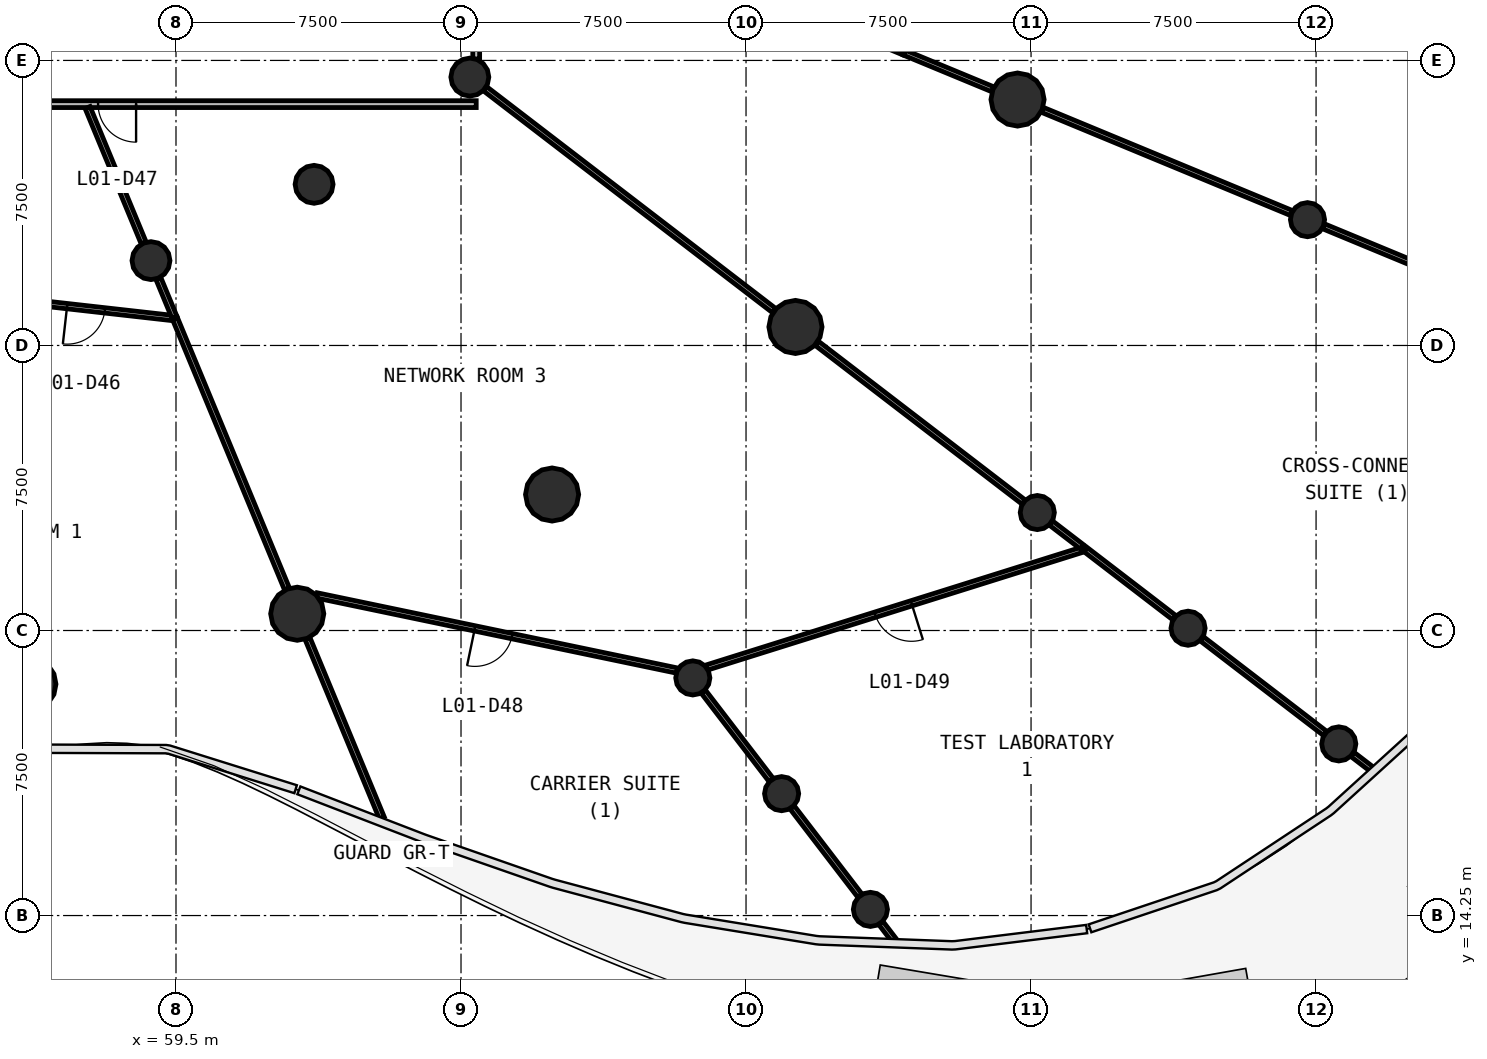
"""IFC4 building model, lengths in metres.
Left out: names, types, materials, properties, quantities, classifications, styles, units other than length and angle.
Written with IfcOpenShell. Run it as: python <this file> out.ifc"""

import sys

from ifc_helpers import new_model, si_unit, direction, frame, frame_2d, origin, origin_2d, place, context, subcontext, project, spatial, rectangle, circle, extrude, source, transform, mapped, element, fill, save


model = new_model("IFC4")
c1 = context("Model", 3, precision=1e-05, world=origin(), true_north=direction((0.0, 1.0)))
c2 = subcontext(c1, "Body", "Model", "MODEL_VIEW")
j1 = project(units=[si_unit("LENGTHUNIT", "METRE"), si_unit("PLANEANGLEUNIT", "RADIAN")], contexts=[c1])
p1 = place(None, origin())
s1 = spatial("IfcSite", under=j1, at=p1, CompositionType="ELEMENT")
p2 = place(p1, origin())
s2 = spatial("IfcBuilding", under=s1, at=p2, CompositionType="ELEMENT")
p3 = place(p2, frame((0.0, 0.0, 5.0)))
s3 = spatial("IfcBuildingStorey", under=s2, at=p3, CompositionType="ELEMENT", Elevation=5.0)
m1 = source(origin(), c2, "Body", "SweptSolid", [
    extrude(circle(Radius=0.7, at=origin_2d()), origin(), (0.0, 0.0, 1.0), 4.4),
])
for number, where, z_axis, x_axis in (
    (1, (55.642, 20.339, 0.0), (0.0, 0.0, 1.0), (1.0, 0.0, 0.0)),
    (2, (62.69, 22.191, 0.0), (0.0, 0.0, 1.0), (1.0, 0.0, 0.0)),
    (3, (69.396, 25.328, 0.0), (0.0, 0.0, 1.0), (1.0, 0.0, 0.0)),
    (4, (75.801, 29.737, 0.0), (0.0, 0.0, 1.0), (1.0, 0.0, 0.0)),
    (5, (81.645, 35.721, 0.0), (0.0, 0.0, 1.0), (1.0, 0.0, 0.0)),
):
    element("IfcColumn", number, at=place(p3, frame(where, z_axis=z_axis, x_axis=x_axis)), inside=s3, PredefinedType="COLUMN", context=c2, shape_type="MappedRepresentation", body=[
        mapped(m1, transform((0.0, 0.0, 0.0), scale=1.0)),
    ])
m2 = source(origin(), c2, "Body", "SweptSolid", [
    extrude(circle(Radius=0.5, at=origin_2d()), origin(), (0.0, 0.0, 1.0), 4.4),
])
for number, where, z_axis, x_axis in (
    (6, (58.842, 31.482, 0.0), (0.0, 0.0, 1.0), (1.0, 0.0, 0.0)),
    (7, (63.134, 33.49, 0.0), (0.0, 0.0, 1.0), (1.0, 0.0, 0.0)),
    (8, (67.232, 36.312, 0.0), (0.0, 0.0, 1.0), (1.0, 0.0, 0.0)),
):
    element("IfcColumn", number, at=place(p3, frame(where, z_axis=z_axis, x_axis=x_axis)), inside=s3, PredefinedType="COLUMN", context=c2, shape_type="MappedRepresentation", body=[
        mapped(m2, transform((0.0, 0.0, 0.0), scale=1.0)),
    ])
m3 = source(origin(), c2, "Body", "SweptSolid", [
    extrude(circle(Radius=0.45, at=origin_2d()), origin(), (0.0, 0.0, 1.0), 4.05),
])
for number, where, z_axis, x_axis in (
    (9, (77.773, 14.412, 0.0), (0.0, 0.0, 1.0), (1.0, 0.0, 0.0)),
    (10, (90.098, 18.767, 0.0), (0.0, 0.0, 1.0), (1.0, 0.0, 0.0)),
):
    element("IfcColumn", number, at=place(p3, frame(where, z_axis=z_axis, x_axis=x_axis)), inside=s3, PredefinedType="COLUMN", context=c2, shape_type="MappedRepresentation", body=[
        mapped(m3, transform((0.0, 0.0, 0.0), scale=1.0)),
    ])
m4 = source(origin(), c2, "Body", "SweptSolid", [
    extrude(circle(Radius=0.45, at=origin_2d()), origin(), (0.0, 0.0, 1.0), 4.4),
])
for number, where, z_axis, x_axis in (
    (11, (75.436, 17.457, 0.0), (0.0, 0.0, 1.0), (1.0, 0.0, 0.0)),
    (12, (86.131, 21.81, 0.0), (0.0, 0.0, 1.0), (1.0, 0.0, 0.0)),
    (13, (73.1, 20.503, 0.0), (0.0, 0.0, 1.0), (1.0, 0.0, 0.0)),
    (14, (82.165, 24.854, 0.0), (0.0, 0.0, 1.0), (1.0, 0.0, 0.0)),
    (15, (89.275, 32.56, 0.0), (0.0, 0.0, 1.0), (1.0, 0.0, 0.0)),
):
    element("IfcColumn", number, at=place(p3, frame(where, z_axis=z_axis, x_axis=x_axis)), inside=s3, PredefinedType="COLUMN", context=c2, shape_type="MappedRepresentation", body=[
        mapped(m4, transform((0.0, 0.0, 0.0), scale=1.0)),
    ])
p4 = place(p3, frame((67.4, 35.6, 0.0), z_axis=(0.0, 0.0, 1.0), x_axis=(-1.0, 0.0, 0.0)))
e16 = element("IfcWall", 16, at=p4, inside=s3, PredefinedType="PARTITIONING", context=c2, shape_type="SweptSolid", body=[
    extrude(rectangle(XDim=30.8, YDim=0.18, at=frame_2d((15.4, 0.0))), origin(), (0.0, 0.0, 1.0), 3.25),
])
p5 = place(p4, frame((17.35, 0.0, 0.0)))
e17 = element("IfcOpeningElement", 17, at=p5, cuts=e16, PredefinedType="OPENING", context=c2, shape_type="SweptSolid", body=[
    extrude(rectangle(XDim=1.0, YDim=2.1, at=frame_2d((0.5, 1.05))), frame((0.0, 0.1, 0.0), z_axis=(0.0, -1.0, 0.0), x_axis=(1.0, 0.0, 0.0)), (0.0, 0.0, 1.0), 0.2),
])
p6 = place(p4, frame((14.95, 0.0, 0.0)))
e18 = element("IfcOpeningElement", 18, at=p6, cuts=e16, PredefinedType="OPENING", context=c2, shape_type="SweptSolid", body=[
    extrude(rectangle(XDim=1.0, YDim=2.1, at=frame_2d((0.5, 1.05))), frame((0.0, 0.1, 0.0), z_axis=(0.0, -1.0, 0.0), x_axis=(1.0, 0.0, 0.0)), (0.0, 0.0, 1.0), 0.2),
])
p7 = place(p4, frame((8.95, 0.0, 0.0)))
e19 = element("IfcOpeningElement", 19, at=p7, cuts=e16, PredefinedType="OPENING", context=c2, shape_type="SweptSolid", body=[
    extrude(rectangle(XDim=1.0, YDim=2.1, at=frame_2d((0.5, 1.05))), frame((0.0, 0.1, 0.0), z_axis=(0.0, -1.0, 0.0), x_axis=(1.0, 0.0, 0.0)), (0.0, 0.0, 1.0), 0.2),
])
p8 = place(p3, frame((67.4, 60.37, 0.0), z_axis=(0.0, 0.0, 1.0), x_axis=(0.0, -1.0, 0.0)))
e20 = element("IfcWall", 20, at=p8, inside=s3, PredefinedType="PARTITIONING", context=c2, shape_type="SweptSolid", body=[
    extrude(rectangle(XDim=23.583, YDim=0.18, at=frame_2d((11.791, 0.0))), origin(), (0.0, 0.0, 1.0), 3.25),
])
p9 = place(p8, frame((11.333, 0.0, 0.0)))
e21 = element("IfcOpeningElement", 21, at=p9, cuts=e20, PredefinedType="OPENING", context=c2, shape_type="SweptSolid", body=[
    extrude(rectangle(XDim=1.0, YDim=2.1, at=frame_2d((0.5, 1.05))), frame((0.0, 0.1, 0.0), z_axis=(0.0, -1.0, 0.0), x_axis=(1.0, 0.0, 0.0)), (0.0, 0.0, 1.0), 0.2),
])
p10 = place(p8, frame((4.532, 0.0, 0.0)))
e22 = element("IfcOpeningElement", 22, at=p10, cuts=e20, PredefinedType="OPENING", context=c2, shape_type="SweptSolid", body=[
    extrude(rectangle(XDim=1.0, YDim=2.1, at=frame_2d((0.5, 1.05))), frame((0.0, 0.1, 0.0), z_axis=(0.0, -1.0, 0.0), x_axis=(1.0, 0.0, 0.0)), (0.0, 0.0, 1.0), 0.2),
])
p11 = place(p8, frame((19.133, 0.0, 0.0)))
e23 = element("IfcOpeningElement", 23, at=p11, cuts=e20, PredefinedType="OPENING", context=c2, shape_type="SweptSolid", body=[
    extrude(rectangle(XDim=1.0, YDim=2.1, at=frame_2d((0.5, 1.05))), frame((0.0, 0.1, 0.0), z_axis=(0.0, -1.0, 0.0), x_axis=(1.0, 0.0, 0.0)), (0.0, 0.0, 1.0), 0.2),
])
p12 = place(p3, frame((83.412, 23.896, 0.0), z_axis=(0.0, 0.0, 1.0), x_axis=(-0.954121832826, -0.299418650262, 0.0)))
e24 = element("IfcWall", 24, at=p12, inside=s3, PredefinedType="PARTITIONING", context=c2, shape_type="SweptSolid", body=[
    extrude(rectangle(XDim=10.427, YDim=0.14, at=frame_2d((5.213, 0.0))), origin(), (0.0, 0.0, 1.0), 3.25),
])
p13 = place(p12, frame((4.777, 0.0, 0.0)))
e25 = element("IfcOpeningElement", 25, at=p13, cuts=e24, PredefinedType="OPENING", context=c2, shape_type="SweptSolid", body=[
    extrude(rectangle(XDim=1.0, YDim=2.1, at=frame_2d((0.5, 1.05))), frame((0.0, 0.08, 0.0), z_axis=(0.0, -1.0, 0.0), x_axis=(1.0, 0.0, 0.0)), (0.0, 0.0, 1.0), 0.16),
])
p14 = place(p3, frame((72.688, 20.695, 0.0), z_axis=(0.0, 0.0, 1.0), x_axis=(-0.978931754846, 0.204187706176, 0.0)))
e26 = element("IfcWall", 26, at=p14, inside=s3, PredefinedType="PARTITIONING", context=c2, shape_type="SweptSolid", body=[
    extrude(rectangle(XDim=9.688, YDim=0.14, at=frame_2d((4.844, 0.0))), origin(), (0.0, 0.0, 1.0), 3.25),
])
p15 = place(p14, frame((4.438, 0.0, 0.0)))
e27 = element("IfcOpeningElement", 27, at=p15, cuts=e26, PredefinedType="OPENING", context=c2, shape_type="SweptSolid", body=[
    extrude(rectangle(XDim=1.0, YDim=2.1, at=frame_2d((0.5, 1.05))), frame((0.0, 0.08, 0.0), z_axis=(0.0, -1.0, 0.0), x_axis=(1.0, 0.0, 0.0)), (0.0, 0.0, 1.0), 0.16),
])
p16 = place(p3, frame((67.633, 36.005, 0.0), z_axis=(0.0, 0.0, 1.0), x_axis=(0.793366218398, -0.608744645566, 0.0)))
e28 = element("IfcWall", 28, at=p16, inside=s3, PredefinedType="PARTITIONING", context=c2, shape_type="SweptSolid", body=[
    extrude(rectangle(XDim=9.591, YDim=0.14, at=frame_2d((4.796, 0.0))), origin(), (0.0, 0.0, 1.0), 3.25),
])
p17 = place(p3, frame((71.439, 39.948, 0.0), z_axis=(0.0, 0.0, 1.0), x_axis=(0.923876369205, -0.382691069173, 0.0)))
e29 = element("IfcWall", 29, at=p17, inside=s3, PredefinedType="PARTITIONING", context=c2, shape_type="SweptSolid", body=[
    extrude(rectangle(XDim=7.796, YDim=0.14, at=frame_2d((3.898, 0.0))), origin(), (0.0, 0.0, 1.0), 3.25),
])
p18 = place(p3, frame((59.47, 29.966, 0.0), z_axis=(0.0, 0.0, 1.0), x_axis=(0.382680867479, -0.923880594918, 0.0)))
e30 = element("IfcWall", 30, at=p18, inside=s3, PredefinedType="PARTITIONING", context=c2, shape_type="SweptSolid", body=[
    extrude(rectangle(XDim=7.71, YDim=0.14, at=frame_2d((3.855, 0.0))), origin(), (0.0, 0.0, 1.0), 3.25),
])
p19 = place(p3, frame((82.296, 35.451, 0.0), z_axis=(0.0, 0.0, 1.0), x_axis=(0.923879762642, -0.382682876779, 0.0)))
e31 = element("IfcWall", 31, at=p19, inside=s3, PredefinedType="PARTITIONING", context=c2, shape_type="SweptSolid", body=[
    extrude(rectangle(XDim=7.099, YDim=0.14, at=frame_2d((3.549, 0.0))), origin(), (0.0, 0.0, 1.0), 3.25),
])
p20 = place(p3, frame((76.359, 29.309, 0.0), z_axis=(0.0, 0.0, 1.0), x_axis=(0.793338893585, -0.60878025586, 0.0)))
e32 = element("IfcWall", 32, at=p20, inside=s3, PredefinedType="PARTITIONING", context=c2, shape_type="SweptSolid", body=[
    extrude(rectangle(XDim=6.863, YDim=0.14, at=frame_2d((3.431, 0.0))), origin(), (0.0, 0.0, 1.0), 3.25),
])
p21 = place(p3, frame((62.96, 21.54, 0.0), z_axis=(0.0, 0.0, 1.0), x_axis=(0.382657019909, -0.923890472466, 0.0)))
e33 = element("IfcWall", 33, at=p21, inside=s3, PredefinedType="PARTITIONING", context=c2, shape_type="SweptSolid", body=[
    extrude(rectangle(XDim=5.11, YDim=0.14, at=frame_2d((2.555, 0.0))), origin(), (0.0, 0.0, 1.0), 3.25),
])
p22 = place(p3, frame((59.44, 29.969, 0.0), z_axis=(0.0, 0.0, 1.0), x_axis=(-0.99372471244, 0.111853457196, 0.0)))
e34 = element("IfcWall", 34, at=p22, inside=s3, PredefinedType="PARTITIONING", context=c2, shape_type="SweptSolid", body=[
    extrude(rectangle(XDim=4.673, YDim=0.14, at=frame_2d((2.336, 0.0))), origin(), (0.0, 0.0, 1.0), 3.25),
])
p23 = place(p22, frame((1.823, 0.0, 0.0)))
e35 = element("IfcOpeningElement", 35, at=p23, cuts=e34, PredefinedType="OPENING", context=c2, shape_type="SweptSolid", body=[
    extrude(rectangle(XDim=1.0, YDim=2.1, at=frame_2d((0.5, 1.05))), frame((0.0, 0.08, 0.0), z_axis=(0.0, -1.0, 0.0), x_axis=(1.0, 0.0, 0.0)), (0.0, 0.0, 1.0), 0.16),
])
p24 = place(p3, frame((86.492, 21.533, 0.0), z_axis=(0.0, 0.0, 1.0), x_axis=(0.793355578527, -0.608758512072, 0.0)))
e36 = element("IfcWall", 36, at=p24, inside=s3, PredefinedType="PARTITIONING", context=c2, shape_type="SweptSolid", body=[
    extrude(rectangle(XDim=4.091, YDim=0.14, at=frame_2d((2.045, 0.0))), origin(), (0.0, 0.0, 1.0), 3.25),
])
p25 = place(p3, frame((89.695, 32.386, 0.0), z_axis=(0.0, 0.0, 1.0), x_axis=(0.92386621601, -0.382715579661, 0.0)))
e37 = element("IfcWall", 37, at=p25, inside=s3, PredefinedType="PARTITIONING", context=c2, shape_type="SweptSolid", body=[
    extrude(rectangle(XDim=4.09, YDim=0.14, at=frame_2d((2.045, 0.0))), origin(), (0.0, 0.0, 1.0), 3.25),
])
p26 = place(p3, frame((57.174, 35.51, 0.0), z_axis=(0.0, 0.0, 1.0), x_axis=(0.382644558062, -0.923895633817, 0.0)))
e38 = element("IfcWall", 38, at=p26, inside=s3, PredefinedType="PARTITIONING", context=c2, shape_type="SweptSolid", body=[
    extrude(rectangle(XDim=3.854, YDim=0.14, at=frame_2d((1.927, 0.0))), origin(), (0.0, 0.0, 1.0), 3.25),
])
p27 = place(p3, frame((83.436, 23.878, 0.0), z_axis=(0.0, 0.0, 1.0), x_axis=(0.793360579515, -0.608751994552, 0.0)))
e39 = element("IfcWall", 39, at=p27, inside=s3, PredefinedType="PARTITIONING", context=c2, shape_type="SweptSolid", body=[
    extrude(rectangle(XDim=2.943, YDim=0.14, at=frame_2d((1.471, 0.0))), origin(), (0.0, 0.0, 1.0), 3.25),
])
p28 = place(p3, frame((73.376, 20.142, 0.0), z_axis=(0.0, 0.0, 1.0), x_axis=(0.608763898154, -0.793351445643, 0.0)))
e40 = element("IfcWall", 40, at=p28, inside=s3, PredefinedType="PARTITIONING", context=c2, shape_type="SweptSolid", body=[
    extrude(rectangle(XDim=2.93, YDim=0.14, at=frame_2d((1.465, 0.0))), origin(), (0.0, 0.0, 1.0), 3.25),
])
p29 = place(p3, frame((75.713, 17.097, 0.0), z_axis=(0.0, 0.0, 1.0), x_axis=(0.608804147927, -0.793320559085, 0.0)))
e41 = element("IfcWall", 41, at=p29, inside=s3, PredefinedType="PARTITIONING", context=c2, shape_type="SweptSolid", body=[
    extrude(rectangle(XDim=2.929, YDim=0.14, at=frame_2d((1.465, 0.0))), origin(), (0.0, 0.0, 1.0), 3.25),
])
p30 = place(p3, frame((78.669, 36.953, 0.0), z_axis=(0.0, 0.0, 1.0), x_axis=(0.923876063287, -0.382691807705, 0.0)))
e42 = element("IfcWall", 42, at=p30, inside=s3, PredefinedType="PARTITIONING", context=c2, shape_type="SweptSolid", body=[
    extrude(rectangle(XDim=2.515, YDim=0.14, at=frame_2d((1.258, 0.0))), origin(), (0.0, 0.0, 1.0), 3.25),
])
p31 = place(p3, frame((59.035, 31.016, 0.0), z_axis=(0.0, 0.0, 1.0), x_axis=(0.382734948308, -0.923858192226, 0.0)))
e43 = element("IfcWall", 43, at=p31, inside=s3, PredefinedType="PARTITIONING", context=c2, shape_type="SweptSolid", body=[
    extrude(rectangle(XDim=1.107, YDim=0.14, at=frame_2d((0.553, 0.0))), origin(), (0.0, 0.0, 1.0), 3.25),
])
p32 = place(p3, frame((82.525, 24.577, 0.0), z_axis=(0.0, 0.0, 1.0), x_axis=(0.793370394363, -0.608739203065, 0.0)))
e44 = element("IfcWall", 44, at=p32, inside=s3, PredefinedType="PARTITIONING", context=c2, shape_type="SweptSolid", body=[
    extrude(rectangle(XDim=1.033, YDim=0.14, at=frame_2d((0.516, 0.0))), origin(), (0.0, 0.0, 1.0), 3.25),
])
p33 = place(p3, frame((90.458, 18.49, 0.0), z_axis=(0.0, 0.0, 1.0), x_axis=(0.793339619552, -0.608779309807, 0.0)))
e45 = element("IfcWall", 45, at=p33, inside=s3, PredefinedType="PARTITIONING", context=c2, shape_type="SweptSolid", body=[
    extrude(rectangle(XDim=0.634, YDim=0.14, at=frame_2d((0.317, 0.0))), origin(), (0.0, 0.0, 1.0), 3.25),
])
p34 = place(p3, frame((78.05, 14.052, 0.0), z_axis=(0.0, 0.0, 1.0), x_axis=(0.608753749501, -0.793359232926, 0.0)))
e46 = element("IfcWall", 46, at=p34, inside=s3, PredefinedType="PARTITIONING", context=c2, shape_type="SweptSolid", body=[
    extrude(rectangle(XDim=0.604, YDim=0.14, at=frame_2d((0.302, 0.0))), origin(), (0.0, 0.0, 1.0), 3.25),
])
m5 = source(origin(), c2, "Body", "SweptSolid", [
    extrude(rectangle(XDim=1.0, YDim=2.1, at=frame_2d((0.5, 1.05))), frame((0.0, 0.025, 0.0), z_axis=(0.0, -1.0, 0.0), x_axis=(1.0, 0.0, 0.0)), (0.0, 0.0, 1.0), 0.05),
])
p35 = place(p23, origin())
e47 = element("IfcDoor", 47, at=p35, inside=s3, OperationType="SINGLE_SWING_RIGHT", PredefinedType="DOOR", context=c2, shape_type="MappedRepresentation", body=[
    mapped(m5, transform((0.0, 0.0, 0.0), scale=1.0)),
])
fill(e35, e47)
p36 = place(p7, origin())
e48 = element("IfcDoor", 48, at=p36, inside=s3, OperationType="SINGLE_SWING_LEFT", PredefinedType="DOOR", context=c2, shape_type="MappedRepresentation", body=[
    mapped(m5, transform((0.0, 0.0, 0.0), scale=1.0)),
])
fill(e19, e48)
p37 = place(p15, origin())
e49 = element("IfcDoor", 49, at=p37, inside=s3, OperationType="SINGLE_SWING_RIGHT", PredefinedType="DOOR", context=c2, shape_type="MappedRepresentation", body=[
    mapped(m5, transform((0.0, 0.0, 0.0), scale=1.0)),
])
fill(e27, e49)
p38 = place(p13, origin())
e50 = element("IfcDoor", 50, at=p38, inside=s3, OperationType="SINGLE_SWING_LEFT", PredefinedType="DOOR", context=c2, shape_type="MappedRepresentation", body=[
    mapped(m5, transform((0.0, 0.0, 0.0), scale=1.0)),
])
fill(e25, e50)
save(model, sys.argv[1])
